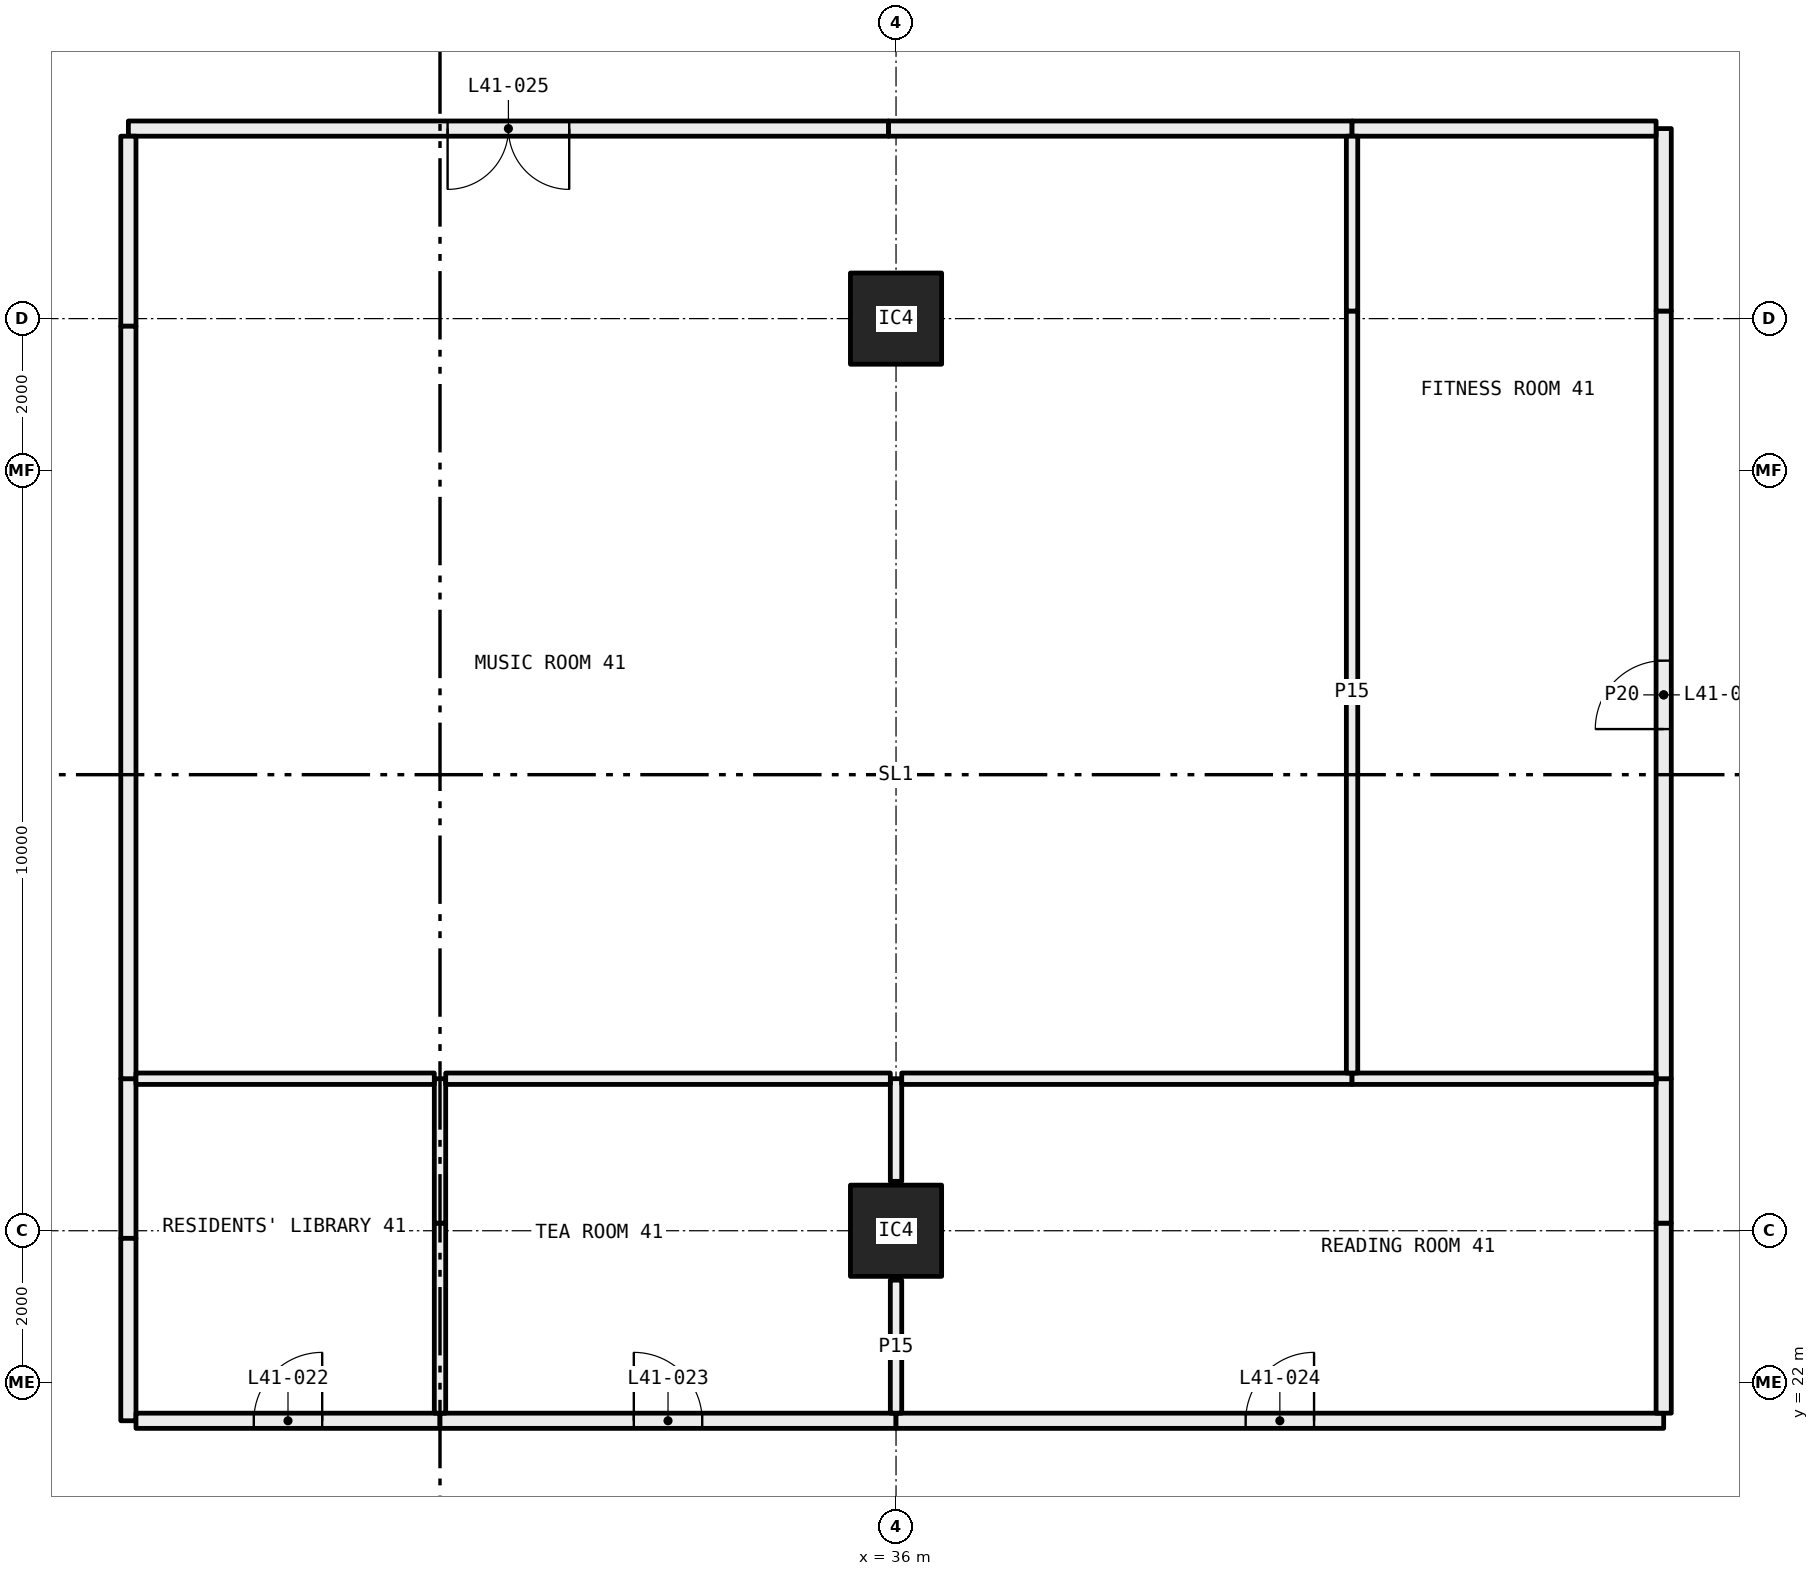
"""IFC4 building model, lengths in metres.
Left out: names, types, materials, properties, quantities, classifications, styles, units other than length and angle.
Written with IfcOpenShell. Run it as: python <this file> out.ifc"""

import sys

from ifc_helpers import new_model, si_unit, direction, frame, frame_2d, origin, origin_2d, place, context, subcontext, project, spatial, rectangle, hollow_rectangle, extrude, element, fill, save


model = new_model("IFC4")
c1 = context("Model", 3, precision=1e-05, world=origin(), true_north=direction((0.0, 1.0)))
c2 = subcontext(c1, "Body", "Model", "MODEL_VIEW")
j1 = project(units=[si_unit("LENGTHUNIT", "METRE"), si_unit("PLANEANGLEUNIT", "RADIAN")], contexts=[c1])
p1 = place(None, origin())
s1 = spatial("IfcSite", under=j1, at=p1, CompositionType="ELEMENT")
p2 = place(p1, origin())
s2 = spatial("IfcBuilding", under=s1, at=p2, CompositionType="ELEMENT")
p3 = place(p2, frame((0.0, 0.0, 158.25)))
s3 = spatial("IfcBuildingStorey", under=s2, at=p3, CompositionType="ELEMENT", Elevation=158.25)
for number, where, z_axis, x_axis in (
    (1, (36.0, 24.0, 0.0), (0.0, 0.0, 1.0), (1.0, 0.0, 0.0)),
    (2, (36.0, 36.0, 0.0), (0.0, 0.0, 1.0), (1.0, 0.0, 0.0)),
):
    element("IfcColumn", number, at=place(p3, frame(where, z_axis=z_axis, x_axis=x_axis)), inside=s3, PredefinedType="COLUMN", context=c2, shape_type="SweptSolid", body=[
        extrude(hollow_rectangle(XDim=1.2, YDim=1.2, WallThickness=0.05, at=origin_2d()), origin(), (0.0, 0.0, 1.0), 3.05),
    ])
p4 = place(p3, frame((25.9, 26.0, 0.0), z_axis=(0.0, 0.0, 1.0), x_axis=(0.0, -1.0, 0.0)))
e3 = element("IfcWall", 3, at=p4, inside=s3, PredefinedType="PARTITIONING", context=c2, shape_type="SweptSolid", body=[
    extrude(rectangle(XDim=2.1, YDim=0.2, at=frame_2d((1.05, 0.0))), origin(), (0.0, 0.0, 1.0), 2.45),
])
p5 = place(p3, frame((25.9, 23.9, 0.0), z_axis=(0.0, 0.0, 1.0), x_axis=(0.0, -1.0, 0.0)))
e4 = element("IfcWall", 4, at=p5, inside=s3, PredefinedType="PARTITIONING", context=c2, shape_type="SweptSolid", body=[
    extrude(rectangle(XDim=2.4, YDim=0.2, at=frame_2d((1.2, 0.0))), origin(), (0.0, 0.0, 1.0), 3.05),
])
p6 = place(p3, frame((26.0, 21.5, 0.0), z_axis=(0.0, 0.0, 1.0), x_axis=(1.0, 0.0, 0.0)))
e5 = element("IfcWall", 5, at=p6, inside=s3, PredefinedType="PARTITIONING", context=c2, shape_type="SweptSolid", body=[
    extrude(rectangle(XDim=4.0, YDim=0.2, at=frame_2d((2.0, 0.0))), origin(), (0.0, 0.0, 1.0), 3.05),
])
p7 = place(p6, frame((1.55, 0.0, 0.0)))
e6 = element("IfcOpeningElement", 6, at=p7, cuts=e5, PredefinedType="OPENING", context=c2, shape_type="SweptSolid", body=[
    extrude(rectangle(XDim=0.9, YDim=2.1, at=frame_2d((0.45, 1.05))), frame((0.0, 0.11, 0.0), z_axis=(0.0, -1.0, 0.0), x_axis=(1.0, 0.0, 0.0)), (0.0, 0.0, 1.0), 0.22),
])
p8 = place(p3, frame((30.0, 21.5, 0.0), z_axis=(0.0, 0.0, 1.0), x_axis=(1.0, 0.0, 0.0)))
e7 = element("IfcWall", 7, at=p8, inside=s3, PredefinedType="PARTITIONING", context=c2, shape_type="SweptSolid", body=[
    extrude(rectangle(XDim=6.0, YDim=0.2, at=frame_2d((3.0, 0.0))), origin(), (0.0, 0.0, 1.0), 2.45),
])
p9 = place(p8, frame((2.55, 0.0, 0.0)))
e8 = element("IfcOpeningElement", 8, at=p9, cuts=e7, PredefinedType="OPENING", context=c2, shape_type="SweptSolid", body=[
    extrude(rectangle(XDim=0.9, YDim=2.1, at=frame_2d((0.45, 1.05))), frame((0.0, 0.11, 0.0), z_axis=(0.0, -1.0, 0.0), x_axis=(1.0, 0.0, 0.0)), (0.0, 0.0, 1.0), 0.22),
])
p10 = place(p3, frame((36.0, 21.5, 0.0), z_axis=(0.0, 0.0, 1.0), x_axis=(1.0, 0.0, 0.0)))
e9 = element("IfcWall", 9, at=p10, inside=s3, PredefinedType="PARTITIONING", context=c2, shape_type="SweptSolid", body=[
    extrude(rectangle(XDim=10.1, YDim=0.2, at=frame_2d((5.05, 0.0))), origin(), (0.0, 0.0, 1.0), 2.45),
])
p11 = place(p10, frame((4.6, 0.0, 0.0)))
e10 = element("IfcOpeningElement", 10, at=p11, cuts=e9, PredefinedType="OPENING", context=c2, shape_type="SweptSolid", body=[
    extrude(rectangle(XDim=0.9, YDim=2.1, at=frame_2d((0.45, 1.05))), frame((0.0, 0.11, 0.0), z_axis=(0.0, -1.0, 0.0), x_axis=(1.0, 0.0, 0.0)), (0.0, 0.0, 1.0), 0.22),
])
p12 = place(p3, frame((46.1, 21.6, 0.0), z_axis=(0.0, 0.0, 1.0), x_axis=(0.0, 1.0, 0.0)))
e11 = element("IfcWall", 11, at=p12, inside=s3, PredefinedType="PARTITIONING", context=c2, shape_type="SweptSolid", body=[
    extrude(rectangle(XDim=2.5, YDim=0.2, at=frame_2d((1.25, 0.0))), origin(), (0.0, 0.0, 1.0), 2.45),
])
p13 = place(p3, frame((46.1, 24.1, 0.0), z_axis=(0.0, 0.0, 1.0), x_axis=(0.0, 1.0, 0.0)))
e12 = element("IfcWall", 12, at=p13, inside=s3, PredefinedType="PARTITIONING", context=c2, shape_type="SweptSolid", body=[
    extrude(rectangle(XDim=1.9, YDim=0.2, at=frame_2d((0.95, 0.0))), origin(), (0.0, 0.0, 1.0), 3.05),
])
p14 = place(p3, frame((42.0, 38.5, 0.0), z_axis=(0.0, 0.0, 1.0), x_axis=(-1.0, 0.0, 0.0)))
e13 = element("IfcWall", 13, at=p14, inside=s3, PredefinedType="PARTITIONING", context=c2, shape_type="SweptSolid", body=[
    extrude(rectangle(XDim=6.1, YDim=0.2, at=frame_2d((3.05, 0.0))), origin(), (0.0, 0.0, 1.0), 2.45),
])
p15 = place(p3, frame((35.9, 38.5, 0.0), z_axis=(0.0, 0.0, 1.0), x_axis=(-1.0, 0.0, 0.0)))
e14 = element("IfcWall", 14, at=p15, inside=s3, PredefinedType="PARTITIONING", context=c2, shape_type="SweptSolid", body=[
    extrude(rectangle(XDim=10.0, YDim=0.2, at=frame_2d((5.0, 0.0))), origin(), (0.0, 0.0, 1.0), 3.05),
])
p16 = place(p15, frame((4.2, 0.0, 0.0)))
e15 = element("IfcOpeningElement", 15, at=p16, cuts=e14, PredefinedType="OPENING", context=c2, shape_type="SweptSolid", body=[
    extrude(rectangle(XDim=1.6, YDim=2.1, at=frame_2d((0.8, 1.05))), frame((0.0, 0.11, 0.0), z_axis=(0.0, -1.0, 0.0), x_axis=(1.0, 0.0, 0.0)), (0.0, 0.0, 1.0), 0.22),
])
p17 = place(p3, frame((25.9, 38.4, 0.0), z_axis=(0.0, 0.0, 1.0), x_axis=(0.0, -1.0, 0.0)))
e16 = element("IfcWall", 16, at=p17, inside=s3, PredefinedType="PARTITIONING", context=c2, shape_type="SweptSolid", body=[
    extrude(rectangle(XDim=2.5, YDim=0.2, at=frame_2d((1.25, 0.0))), origin(), (0.0, 0.0, 1.0), 2.45),
])
p18 = place(p3, frame((25.9, 35.9, 0.0), z_axis=(0.0, 0.0, 1.0), x_axis=(0.0, -1.0, 0.0)))
e17 = element("IfcWall", 17, at=p18, inside=s3, PredefinedType="PARTITIONING", context=c2, shape_type="SweptSolid", body=[
    extrude(rectangle(XDim=9.9, YDim=0.2, at=frame_2d((4.95, 0.0))), origin(), (0.0, 0.0, 1.0), 3.05),
])
p19 = place(p3, frame((46.1, 26.0, 0.0), z_axis=(0.0, 0.0, 1.0), x_axis=(0.0, 1.0, 0.0)))
e18 = element("IfcWall", 18, at=p19, inside=s3, PredefinedType="PARTITIONING", context=c2, shape_type="SweptSolid", body=[
    extrude(rectangle(XDim=10.1, YDim=0.2, at=frame_2d((5.05, 0.0))), origin(), (0.0, 0.0, 1.0), 2.45),
])
p20 = place(p19, frame((4.6, 0.0, 0.0)))
e19 = element("IfcOpeningElement", 19, at=p20, cuts=e18, PredefinedType="OPENING", context=c2, shape_type="SweptSolid", body=[
    extrude(rectangle(XDim=0.9, YDim=2.1, at=frame_2d((0.45, 1.05))), frame((0.0, 0.11, 0.0), z_axis=(0.0, -1.0, 0.0), x_axis=(1.0, 0.0, 0.0)), (0.0, 0.0, 1.0), 0.22),
])
p21 = place(p3, frame((46.1, 36.1, 0.0), z_axis=(0.0, 0.0, 1.0), x_axis=(0.0, 1.0, 0.0)))
e20 = element("IfcWall", 20, at=p21, inside=s3, PredefinedType="PARTITIONING", context=c2, shape_type="SweptSolid", body=[
    extrude(rectangle(XDim=2.4, YDim=0.2, at=frame_2d((1.2, 0.0))), origin(), (0.0, 0.0, 1.0), 3.05),
])
p22 = place(p3, frame((46.0, 38.5, 0.0), z_axis=(0.0, 0.0, 1.0), x_axis=(-1.0, 0.0, 0.0)))
e21 = element("IfcWall", 21, at=p22, inside=s3, PredefinedType="PARTITIONING", context=c2, shape_type="SweptSolid", body=[
    extrude(rectangle(XDim=4.0, YDim=0.2, at=frame_2d((2.0, 0.0))), origin(), (0.0, 0.0, 1.0), 3.05),
])
p23 = place(p3, frame((30.0, 21.6, 0.0), z_axis=(0.0, 0.0, 1.0), x_axis=(0.0, 1.0, 0.0)))
e22 = element("IfcWall", 22, at=p23, inside=s3, PredefinedType="PARTITIONING", context=c2, shape_type="SweptSolid", body=[
    extrude(rectangle(XDim=2.5, YDim=0.15, at=frame_2d((1.25, 0.0))), origin(), (0.0, 0.0, 1.0), 2.45),
])
p24 = place(p3, frame((30.0, 24.1, 0.0), z_axis=(0.0, 0.0, 1.0), x_axis=(0.0, 1.0, 0.0)))
e23 = element("IfcWall", 23, at=p24, inside=s3, PredefinedType="PARTITIONING", context=c2, shape_type="SweptSolid", body=[
    extrude(rectangle(XDim=1.9, YDim=0.15, at=frame_2d((0.95, 0.0))), origin(), (0.0, 0.0, 1.0), 3.05),
])
p25 = place(p3, frame((29.925, 26.0, 0.0), z_axis=(0.0, 0.0, 1.0), x_axis=(-1.0, 0.0, 0.0)))
e24 = element("IfcWall", 24, at=p25, inside=s3, PredefinedType="PARTITIONING", context=c2, shape_type="SweptSolid", body=[
    extrude(rectangle(XDim=3.925, YDim=0.15, at=frame_2d((1.962, 0.0))), origin(), (0.0, 0.0, 1.0), 3.05),
])
p26 = place(p3, frame((36.0, 21.6, 0.0), z_axis=(0.0, 0.0, 1.0), x_axis=(0.0, 1.0, 0.0)))
e25 = element("IfcWall", 25, at=p26, inside=s3, PredefinedType="PARTITIONING", context=c2, shape_type="SweptSolid", body=[
    extrude(rectangle(XDim=1.75, YDim=0.15, at=frame_2d((0.875, 0.0))), origin(), (0.0, 0.0, 1.0), 2.45),
])
p27 = place(p3, frame((36.0, 24.65, 0.0), z_axis=(0.0, 0.0, 1.0), x_axis=(0.0, 1.0, 0.0)))
e26 = element("IfcWall", 26, at=p27, inside=s3, PredefinedType="PARTITIONING", context=c2, shape_type="SweptSolid", body=[
    extrude(rectangle(XDim=1.35, YDim=0.15, at=frame_2d((0.675, 0.0))), origin(), (0.0, 0.0, 1.0), 2.45),
])
p28 = place(p3, frame((35.925, 26.0, 0.0), z_axis=(0.0, 0.0, 1.0), x_axis=(-1.0, 0.0, 0.0)))
e27 = element("IfcWall", 27, at=p28, inside=s3, PredefinedType="PARTITIONING", context=c2, shape_type="SweptSolid", body=[
    extrude(rectangle(XDim=5.85, YDim=0.15, at=frame_2d((2.925, 0.0))), origin(), (0.0, 0.0, 1.0), 2.45),
])
p29 = place(p3, frame((42.0, 26.0, 0.0), z_axis=(0.0, 0.0, 1.0), x_axis=(-1.0, 0.0, 0.0)))
e28 = element("IfcWall", 28, at=p29, inside=s3, PredefinedType="PARTITIONING", context=c2, shape_type="SweptSolid", body=[
    extrude(rectangle(XDim=5.925, YDim=0.15, at=frame_2d((2.962, 0.0))), origin(), (0.0, 0.0, 1.0), 2.45),
])
p30 = place(p3, frame((46.0, 26.0, 0.0), z_axis=(0.0, 0.0, 1.0), x_axis=(-1.0, 0.0, 0.0)))
e29 = element("IfcWall", 29, at=p30, inside=s3, PredefinedType="PARTITIONING", context=c2, shape_type="SweptSolid", body=[
    extrude(rectangle(XDim=4.0, YDim=0.15, at=frame_2d((2.0, 0.0))), origin(), (0.0, 0.0, 1.0), 3.05),
])
p31 = place(p3, frame((42.0, 26.075, 0.0), z_axis=(0.0, 0.0, 1.0), x_axis=(0.0, 1.0, 0.0)))
e30 = element("IfcWall", 30, at=p31, inside=s3, PredefinedType="PARTITIONING", context=c2, shape_type="SweptSolid", body=[
    extrude(rectangle(XDim=10.025, YDim=0.15, at=frame_2d((5.013, 0.0))), origin(), (0.0, 0.0, 1.0), 2.45),
])
p32 = place(p3, frame((42.0, 36.1, 0.0), z_axis=(0.0, 0.0, 1.0), x_axis=(0.0, 1.0, 0.0)))
e31 = element("IfcWall", 31, at=p32, inside=s3, PredefinedType="PARTITIONING", context=c2, shape_type="SweptSolid", body=[
    extrude(rectangle(XDim=2.3, YDim=0.15, at=frame_2d((1.15, 0.0))), origin(), (0.0, 0.0, 1.0), 3.05),
])
p33 = place(p7, origin())
e32 = element("IfcDoor", 32, at=p33, inside=s3, OperationType="SINGLE_SWING_LEFT", PredefinedType="DOOR", context=c2, shape_type="SweptSolid", body=[
    extrude(rectangle(XDim=0.9, YDim=2.1, at=frame_2d((0.45, 1.05))), frame((0.0, 0.025, 0.0), z_axis=(0.0, -1.0, 0.0), x_axis=(1.0, 0.0, 0.0)), (0.0, 0.0, 1.0), 0.05),
])
fill(e6, e32)
p34 = place(p9, origin())
e33 = element("IfcDoor", 33, at=p34, inside=s3, OperationType="SINGLE_SWING_RIGHT", PredefinedType="DOOR", context=c2, shape_type="SweptSolid", body=[
    extrude(rectangle(XDim=0.9, YDim=2.1, at=frame_2d((0.45, 1.05))), frame((0.0, 0.025, 0.0), z_axis=(0.0, -1.0, 0.0), x_axis=(1.0, 0.0, 0.0)), (0.0, 0.0, 1.0), 0.05),
])
fill(e8, e33)
p35 = place(p11, origin())
e34 = element("IfcDoor", 34, at=p35, inside=s3, OperationType="SINGLE_SWING_LEFT", PredefinedType="DOOR", context=c2, shape_type="SweptSolid", body=[
    extrude(rectangle(XDim=0.9, YDim=2.1, at=frame_2d((0.45, 1.05))), frame((0.0, 0.025, 0.0), z_axis=(0.0, -1.0, 0.0), x_axis=(1.0, 0.0, 0.0)), (0.0, 0.0, 1.0), 0.05),
])
fill(e10, e34)
p36 = place(p16, origin())
e35 = element("IfcDoor", 35, at=p36, inside=s3, OperationType="DOUBLE_DOOR_SINGLE_SWING", PredefinedType="DOOR", context=c2, shape_type="SweptSolid", body=[
    extrude(rectangle(XDim=1.6, YDim=2.1, at=frame_2d((0.8, 1.05))), frame((0.0, 0.025, 0.0), z_axis=(0.0, -1.0, 0.0), x_axis=(1.0, 0.0, 0.0)), (0.0, 0.0, 1.0), 0.05),
])
fill(e15, e35)
p37 = place(p20, origin())
e36 = element("IfcDoor", 36, at=p37, inside=s3, OperationType="SINGLE_SWING_RIGHT", PredefinedType="DOOR", context=c2, shape_type="SweptSolid", body=[
    extrude(rectangle(XDim=0.9, YDim=2.1, at=frame_2d((0.45, 1.05))), frame((0.0, 0.025, 0.0), z_axis=(0.0, -1.0, 0.0), x_axis=(1.0, 0.0, 0.0)), (0.0, 0.0, 1.0), 0.05),
])
fill(e19, e36)
save(model, sys.argv[1])
